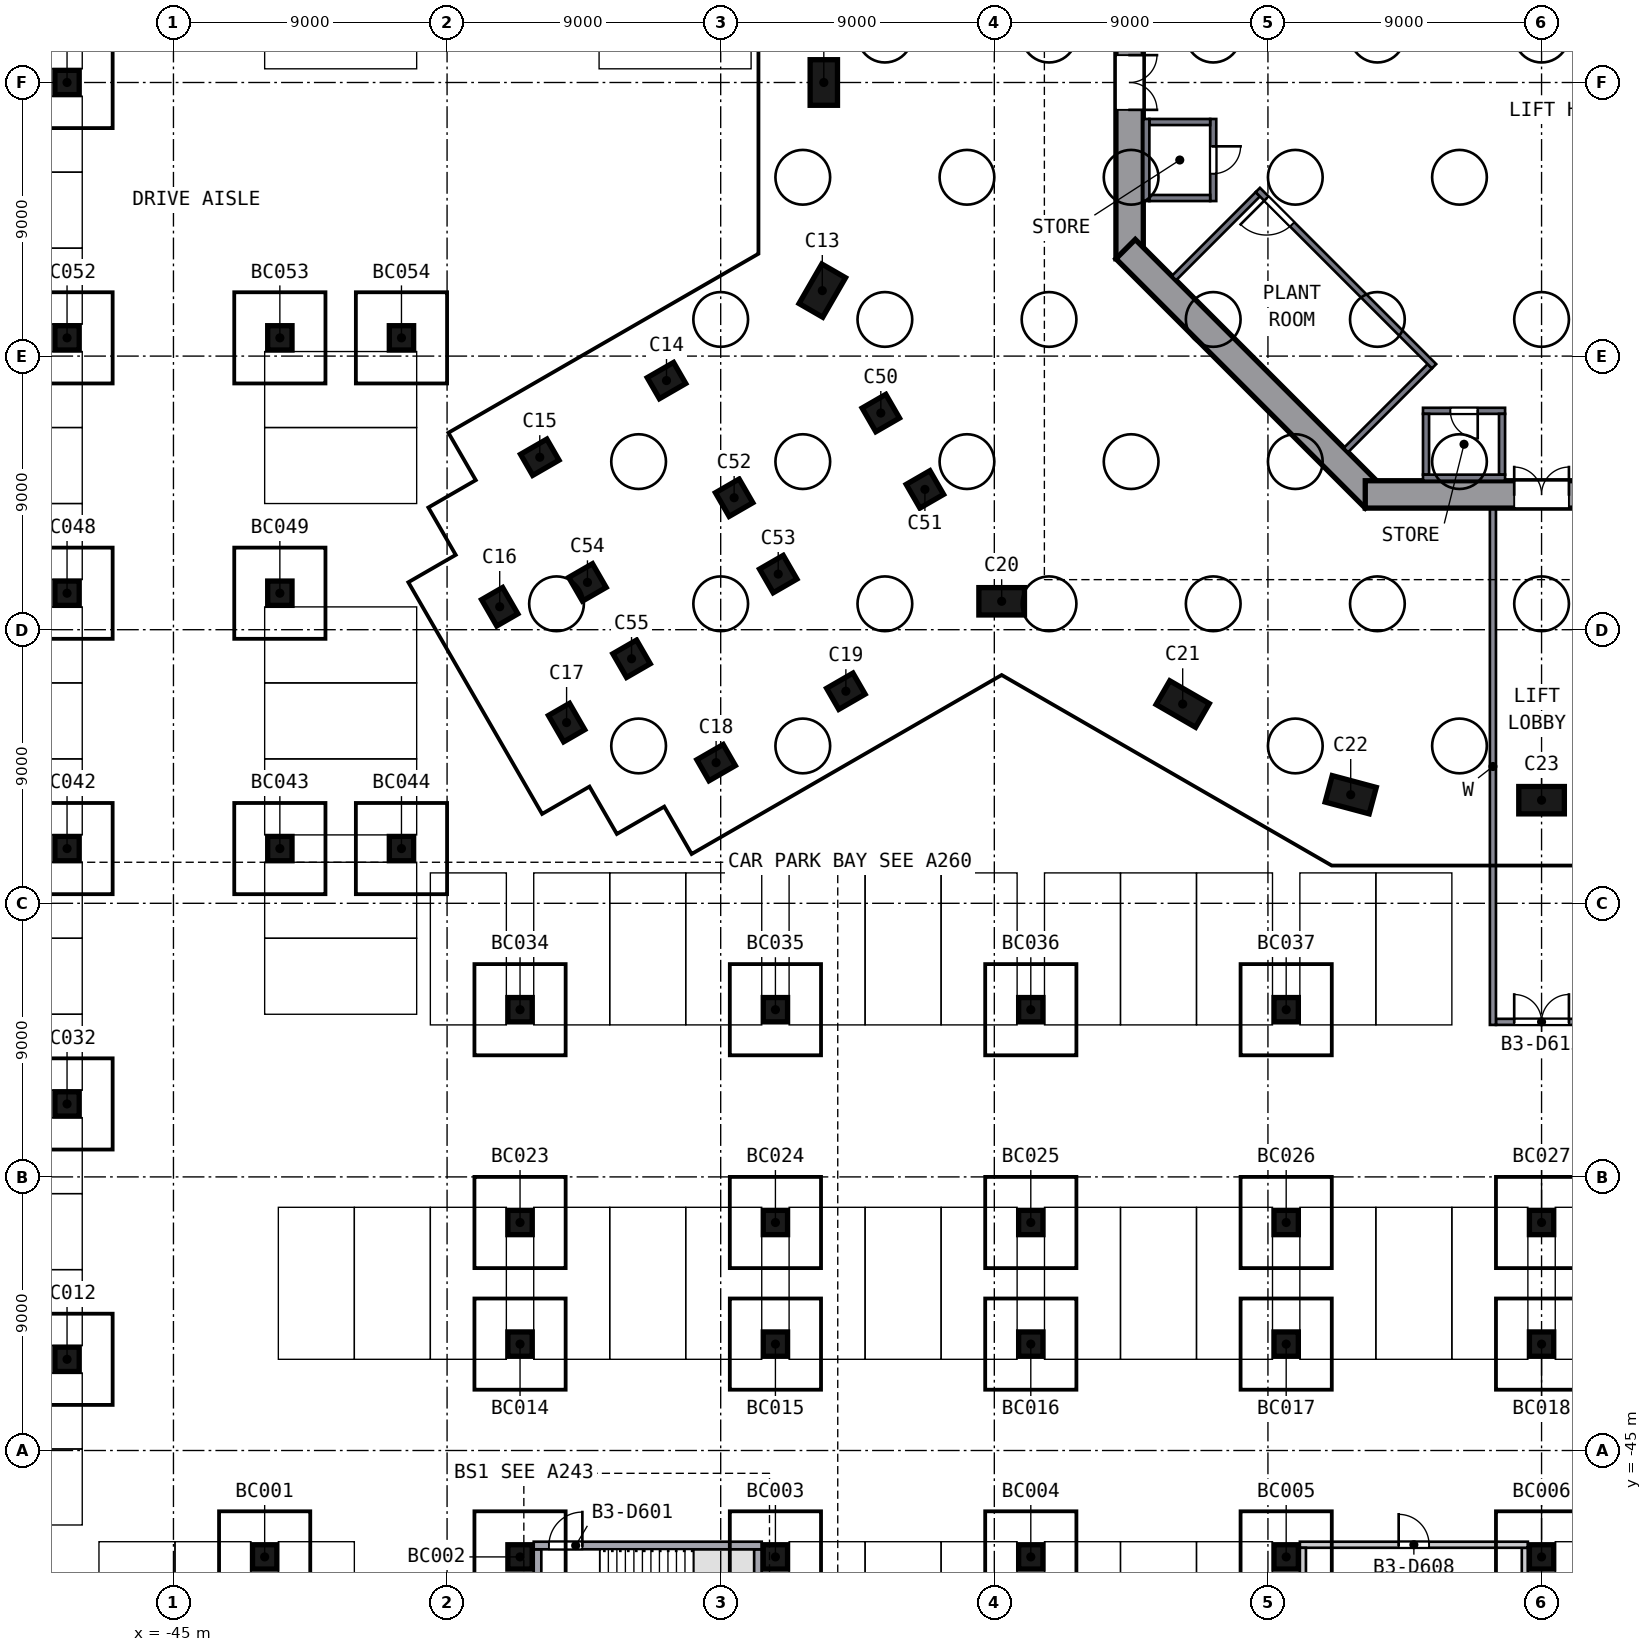
"""IFC4 building model, lengths in metres.
Left out: names, types, materials, properties, quantities, classifications, styles, units other than length and angle.
Written with IfcOpenShell. Run it as: python <this file> out.ifc"""

import sys

from ifc_helpers import new_model, si_unit, direction, frame, frame_2d, origin, origin_2d, place, context, subcontext, project, spatial, polyline, rectangle, outline, extrude, element, fill, save


model = new_model("IFC4")
c1 = context("Model", 3, precision=1e-05, world=origin(), true_north=direction((0.0, 1.0)))
c2 = subcontext(c1, "Body", "Model", "MODEL_VIEW")
j1 = project(units=[si_unit("LENGTHUNIT", "METRE"), si_unit("PLANEANGLEUNIT", "RADIAN")], contexts=[c1])
p1 = place(None, origin())
s1 = spatial("IfcSite", under=j1, at=p1, CompositionType="ELEMENT")
p2 = place(p1, origin())
s2 = spatial("IfcBuilding", under=s1, at=p2, CompositionType="ELEMENT")
p3 = place(p2, frame((0.0, 0.0, -11.7)))
s3 = spatial("IfcBuildingStorey", under=s2, at=p3, CompositionType="ELEMENT", Elevation=-11.7)
for number, where, z_axis, x_axis in (
    (1, (-23.608, 0.0, 0.0), (0.0, 0.0, 1.0), (0.0, -1.0, 0.0)),
    (2, (-23.658, -6.846, 0.0), (0.0, 0.0, 1.0), (0.5, 0.866, 0.0)),
):
    element("IfcColumn", number, at=place(p3, frame(where, z_axis=z_axis, x_axis=x_axis)), inside=s3, PredefinedType="COLUMN", context=c2, shape_type="SweptSolid", body=[
        extrude(rectangle(XDim=1.5, YDim=0.9, at=origin_2d()), origin(), (0.0, 0.0, 1.0), 3.45),
    ])
for number, where, z_axis, x_axis in (
    (3, (-28.783, -9.805, 0.0), (0.0, 0.0, 1.0), (-0.866, -0.5, 0.0)),
    (4, (-32.951, -12.327, 0.0), (0.0, 0.0, 1.0), (-0.866, -0.5, 0.0)),
    (5, (-34.269, -17.245, 0.0), (0.0, 0.0, 1.0), (0.5, -0.866, 0.0)),
    (6, (-32.069, -21.055, 0.0), (0.0, 0.0, 1.0), (0.5, -0.866, 0.0)),
    (7, (-27.151, -22.373, 0.0), (0.0, 0.0, 1.0), (0.866, 0.5, 0.0)),
    (8, (-22.883, -20.024, 0.0), (0.0, 0.0, 1.0), (0.866, 0.5, 0.0)),
):
    element("IfcColumn", number, at=place(p3, frame(where, z_axis=z_axis, x_axis=x_axis)), inside=s3, PredefinedType="COLUMN", context=c2, shape_type="SweptSolid", body=[
        extrude(rectangle(XDim=1.0, YDim=0.8, at=origin_2d()), origin(), (0.0, 0.0, 1.0), 3.45),
    ])
for number, where, z_axis, x_axis in (
    (9, (-17.758, -17.065, 0.0), (0.0, 0.0, 1.0), (-1.0, 0.0, 0.0)),
    (10, (-11.804, -20.445, 0.0), (0.0, 0.0, 1.0), (0.866, -0.5, 0.0)),
    (11, (-6.278, -23.428, 0.0), (0.0, 0.0, 1.0), (-0.966, 0.259, 0.0)),
    (12, (0.0, -23.608, 0.0), (0.0, 0.0, 1.0), (1.0, 0.0, 0.0)),
):
    element("IfcColumn", number, at=place(p3, frame(where, z_axis=z_axis, x_axis=x_axis)), inside=s3, PredefinedType="COLUMN", context=c2, shape_type="SweptSolid", body=[
        extrude(rectangle(XDim=1.5, YDim=0.9, at=origin_2d()), origin(), (0.0, 0.0, 1.0), 3.45),
    ])
for number, where, z_axis, x_axis in (
    (13, (-21.733, -10.873, 0.0), (0.0, 0.0, 1.0), (-0.866, -0.5, 0.0)),
    (14, (-20.283, -13.385, 0.0), (0.0, 0.0, 1.0), (-0.866, -0.5, 0.0)),
    (15, (-26.558, -13.659, 0.0), (0.0, 0.0, 1.0), (-0.866, -0.5, 0.0)),
    (16, (-25.108, -16.17, 0.0), (0.0, 0.0, 1.0), (-0.866, -0.5, 0.0)),
    (17, (-31.382, -16.444, 0.0), (0.0, 0.0, 1.0), (-0.866, -0.5, 0.0)),
    (18, (-29.932, -18.956, 0.0), (0.0, 0.0, 1.0), (-0.866, -0.5, 0.0)),
):
    element("IfcColumn", number, at=place(p3, frame(where, z_axis=z_axis, x_axis=x_axis)), inside=s3, PredefinedType="COLUMN", context=c2, shape_type="SweptSolid", body=[
        extrude(rectangle(XDim=0.9, YDim=0.9, at=origin_2d()), origin(), (0.0, 0.0, 1.0), 3.45),
    ])
p4 = place(p3, frame((-13.55, 5.799, 0.0), z_axis=(0.0, 0.0, 1.0), x_axis=(0.0, -1.0, 0.0)))
e19 = element("IfcWall", 19, at=p4, inside=s3, PredefinedType="SHEAR", context=c2, shape_type="SweptSolid", body=[
    extrude(rectangle(XDim=11.598, YDim=0.9, at=frame_2d((5.799, 0.0))), origin(), (0.0, 0.0, 1.0), 3.9),
])
p5 = place(p4, frame((4.899, 0.0, 0.0)))
e20 = element("IfcOpeningElement", 20, at=p5, cuts=e19, PredefinedType="OPENING", context=c2, shape_type="SweptSolid", body=[
    extrude(rectangle(XDim=1.8, YDim=2.1, at=frame_2d((0.9, 1.05))), frame((0.0, 0.46, 0.0), z_axis=(0.0, -1.0, 0.0), x_axis=(1.0, 0.0, 0.0)), (0.0, 0.0, 1.0), 0.92),
])
p6 = place(p3, frame((-13.682, -5.481, 0.0), z_axis=(0.0, 0.0, 1.0), x_axis=(0.707106781, -0.707106781, 0.0)))
e21 = element("IfcWall", 21, at=p6, inside=s3, PredefinedType="SHEAR", context=c2, shape_type="SweptSolid", body=[
    extrude(rectangle(XDim=11.598, YDim=0.9, at=frame_2d((5.799, 0.0))), origin(), (0.0, 0.0, 1.0), 3.9),
])
p7 = place(p3, frame((-5.799, -13.55, 0.0), z_axis=(0.0, 0.0, 1.0), x_axis=(1.0, 0.0, 0.0)))
e22 = element("IfcWall", 22, at=p7, inside=s3, PredefinedType="SHEAR", context=c2, shape_type="SweptSolid", body=[
    extrude(rectangle(XDim=11.598, YDim=0.9, at=frame_2d((5.799, 0.0))), origin(), (0.0, 0.0, 1.0), 3.9),
])
p8 = place(p7, frame((4.899, 0.0, 0.0)))
e23 = element("IfcOpeningElement", 23, at=p8, cuts=e22, PredefinedType="OPENING", context=c2, shape_type="SweptSolid", body=[
    extrude(rectangle(XDim=1.8, YDim=2.1, at=frame_2d((0.9, 1.05))), frame((0.0, 0.46, 0.0), z_axis=(0.0, -1.0, 0.0), x_axis=(1.0, 0.0, 0.0)), (0.0, 0.0, 1.0), 0.92),
])
for number, where, z_axis, x_axis in (
    (24, (-42.0, -48.5, -0.8), (0.0, 0.0, 1.0), (1.0, 0.0, 0.0)),
    (25, (-33.6, -48.5, -0.8), (0.0, 0.0, 1.0), (1.0, 0.0, 0.0)),
    (26, (-25.2, -48.5, -0.8), (0.0, 0.0, 1.0), (1.0, 0.0, 0.0)),
    (27, (-16.8, -48.5, -0.8), (0.0, 0.0, 1.0), (1.0, 0.0, 0.0)),
    (28, (-8.4, -48.5, -0.8), (0.0, 0.0, 1.0), (1.0, 0.0, 0.0)),
    (29, (0.0, -48.5, -0.8), (0.0, 0.0, 1.0), (1.0, 0.0, 0.0)),
    (30, (-48.5, -42.0, -0.8), (0.0, 0.0, 1.0), (1.0, 0.0, 0.0)),
    (31, (-33.6, -41.5, -0.8), (0.0, 0.0, 1.0), (1.0, 0.0, 0.0)),
    (32, (-25.2, -41.5, -0.8), (0.0, 0.0, 1.0), (1.0, 0.0, 0.0)),
    (33, (-16.8, -41.5, -0.8), (0.0, 0.0, 1.0), (1.0, 0.0, 0.0)),
    (34, (-8.4, -41.5, -0.8), (0.0, 0.0, 1.0), (1.0, 0.0, 0.0)),
    (35, (0.0, -41.5, -0.8), (0.0, 0.0, 1.0), (1.0, 0.0, 0.0)),
    (36, (-33.6, -37.5, -0.8), (0.0, 0.0, 1.0), (1.0, 0.0, 0.0)),
    (37, (-25.2, -37.5, -0.8), (0.0, 0.0, 1.0), (1.0, 0.0, 0.0)),
    (38, (-16.8, -37.5, -0.8), (0.0, 0.0, 1.0), (1.0, 0.0, 0.0)),
    (39, (-8.4, -37.5, -0.8), (0.0, 0.0, 1.0), (1.0, 0.0, 0.0)),
    (40, (0.0, -37.5, -0.8), (0.0, 0.0, 1.0), (1.0, 0.0, 0.0)),
    (41, (-48.5, -33.6, -0.8), (0.0, 0.0, 1.0), (1.0, 0.0, 0.0)),
    (42, (-33.6, -30.5, -0.8), (0.0, 0.0, 1.0), (1.0, 0.0, 0.0)),
    (43, (-25.2, -30.5, -0.8), (0.0, 0.0, 1.0), (1.0, 0.0, 0.0)),
    (44, (-16.8, -30.5, -0.8), (0.0, 0.0, 1.0), (1.0, 0.0, 0.0)),
    (45, (-8.4, -30.5, -0.8), (0.0, 0.0, 1.0), (1.0, 0.0, 0.0)),
    (46, (-48.5, -25.2, -0.8), (0.0, 0.0, 1.0), (1.0, 0.0, 0.0)),
    (47, (-41.5, -25.2, -0.8), (0.0, 0.0, 1.0), (1.0, 0.0, 0.0)),
    (48, (-37.5, -25.2, -0.8), (0.0, 0.0, 1.0), (1.0, 0.0, 0.0)),
    (49, (-48.5, -16.8, -0.8), (0.0, 0.0, 1.0), (1.0, 0.0, 0.0)),
    (50, (-41.5, -16.8, -0.8), (0.0, 0.0, 1.0), (1.0, 0.0, 0.0)),
    (51, (-48.5, -8.4, -0.8), (0.0, 0.0, 1.0), (1.0, 0.0, 0.0)),
    (52, (-41.5, -8.4, -0.8), (0.0, 0.0, 1.0), (1.0, 0.0, 0.0)),
    (53, (-37.5, -8.4, -0.8), (0.0, 0.0, 1.0), (1.0, 0.0, 0.0)),
    (54, (-48.5, 0.0, -0.8), (0.0, 0.0, 1.0), (1.0, 0.0, 0.0)),
):
    element("IfcColumn", number, at=place(p3, frame(where, z_axis=z_axis, x_axis=x_axis)), inside=s3, PredefinedType="COLUMN", context=c2, shape_type="SweptSolid", body=[
        extrude(rectangle(XDim=0.8, YDim=0.8, at=origin_2d()), origin(), (0.0, 0.0, 1.0), 4.7),
    ])
p9 = place(p3, origin())
e55 = element("IfcWall", 55, at=p9, inside=s3, PredefinedType="SOLIDWALL", context=c2, shape_type="SweptSolid", body=[
    extrude(outline(polyline([(-10.9, -1.2), (-10.9, -1.4), (-12.9, -1.4), (-12.9, -1.2), (-10.9, -1.2)])), origin(), (0.0, 0.0, 1.0), 3.45),
])
p10 = place(p3, origin())
e56 = element("IfcWall", 56, at=p10, inside=s3, PredefinedType="SOLIDWALL", context=c2, shape_type="SweptSolid", body=[
    extrude(outline(polyline([(-10.9, -3.7), (-10.9, -3.9), (-12.9, -3.9), (-12.9, -3.7), (-10.9, -3.7)])), origin(), (0.0, 0.0, 1.0), 3.45),
])
p11 = place(p3, origin())
e57 = element("IfcWall", 57, at=p11, inside=s3, PredefinedType="SOLIDWALL", context=c2, shape_type="SweptSolid", body=[
    extrude(outline(polyline([(-12.9, -1.2), (-12.9, -3.9), (-13.1, -3.9), (-13.1, -1.2), (-12.9, -1.2)])), origin(), (0.0, 0.0, 1.0), 3.45),
])
p12 = place(p3, frame((-10.8, -1.2, 0.0), z_axis=(0.0, 0.0, 1.0), x_axis=(0.0, -1.0, 0.0)))
e58 = element("IfcWall", 58, at=p12, inside=s3, PredefinedType="SOLIDWALL", context=c2, shape_type="SweptSolid", body=[
    extrude(rectangle(XDim=2.7, YDim=0.2, at=frame_2d((1.35, 0.0))), origin(), (0.0, 0.0, 1.0), 3.45),
])
p13 = place(p12, frame((0.9, 0.0, 0.0)))
e59 = element("IfcOpeningElement", 59, at=p13, cuts=e58, PredefinedType="OPENING", context=c2, shape_type="SweptSolid", body=[
    extrude(rectangle(XDim=0.9, YDim=2.1, at=frame_2d((0.45, 1.05))), frame((0.0, 0.11, 0.0), z_axis=(0.0, -1.0, 0.0), x_axis=(1.0, 0.0, 0.0)), (0.0, 0.0, 1.0), 0.22),
])
p14 = place(p3, origin())
e60 = element("IfcWall", 60, at=p14, inside=s3, PredefinedType="SOLIDWALL", context=c2, shape_type="SweptSolid", body=[
    extrude(outline(polyline([(-1.2, -10.9), (-1.2, -12.9), (-1.4, -12.9), (-1.4, -10.9), (-1.2, -10.9)])), origin(), (0.0, 0.0, 1.0), 3.45),
])
p15 = place(p3, origin())
e61 = element("IfcWall", 61, at=p15, inside=s3, PredefinedType="SOLIDWALL", context=c2, shape_type="SweptSolid", body=[
    extrude(outline(polyline([(-3.7, -10.9), (-3.7, -12.9), (-3.9, -12.9), (-3.9, -10.9), (-3.7, -10.9)])), origin(), (0.0, 0.0, 1.0), 3.45),
])
p16 = place(p3, origin())
e62 = element("IfcWall", 62, at=p16, inside=s3, PredefinedType="SOLIDWALL", context=c2, shape_type="SweptSolid", body=[
    extrude(outline(polyline([(-1.2, -12.9), (-1.2, -13.1), (-3.9, -13.1), (-3.9, -12.9), (-1.2, -12.9)])), origin(), (0.0, 0.0, 1.0), 3.45),
])
p17 = place(p3, frame((-1.2, -10.8, 0.0), z_axis=(0.0, 0.0, 1.0), x_axis=(-1.0, 0.0, 0.0)))
e63 = element("IfcWall", 63, at=p17, inside=s3, PredefinedType="SOLIDWALL", context=c2, shape_type="SweptSolid", body=[
    extrude(rectangle(XDim=2.7, YDim=0.2, at=frame_2d((1.35, 0.0))), origin(), (0.0, 0.0, 1.0), 3.45),
])
p18 = place(p17, frame((0.9, 0.0, 0.0)))
e64 = element("IfcOpeningElement", 64, at=p18, cuts=e63, PredefinedType="OPENING", context=c2, shape_type="SweptSolid", body=[
    extrude(rectangle(XDim=0.9, YDim=2.1, at=frame_2d((0.45, 1.05))), frame((0.0, 0.11, 0.0), z_axis=(0.0, -1.0, 0.0), x_axis=(1.0, 0.0, 0.0)), (0.0, 0.0, 1.0), 0.22),
])
p19 = place(p3, frame((-3.535, -9.334, 0.0), z_axis=(0.0, 0.0, 1.0), x_axis=(-0.707106781, 0.707106781, 0.0)))
e65 = element("IfcWall", 65, at=p19, inside=s3, PredefinedType="SOLIDWALL", context=c2, shape_type="SweptSolid", body=[
    extrude(rectangle(XDim=8.2, YDim=0.2, at=frame_2d((4.1, 0.0))), origin(), (0.0, 0.0, 1.0), 3.45),
])
p20 = place(p19, frame((6.6, 0.0, 0.0)))
e66 = element("IfcOpeningElement", 66, at=p20, cuts=e65, PredefinedType="OPENING", context=c2, shape_type="SweptSolid", body=[
    extrude(rectangle(XDim=1.2, YDim=2.1, at=frame_2d((0.6, 1.05))), frame((0.0, 0.11, 0.0), z_axis=(0.0, -1.0, 0.0), x_axis=(1.0, 0.0, 0.0)), (0.0, 0.0, 1.0), 0.22),
])
for number, where, z_axis, x_axis in (
    (67, (-9.334, -3.677, 0.0), (0.0, 0.0, 1.0), (-0.707, -0.707, 0.0)),
    (68, (-3.677, -9.334, 0.0), (0.0, 0.0, 1.0), (-0.707, -0.707, 0.0)),
):
    element("IfcWall", number, at=place(p3, frame(where, z_axis=z_axis, x_axis=x_axis)), inside=s3, PredefinedType="SOLIDWALL", context=c2, shape_type="SweptSolid", body=[
        extrude(rectangle(XDim=3.9, YDim=0.2, at=frame_2d((1.95, 0.0))), origin(), (0.0, 0.0, 1.0), 3.45),
    ])
p21 = place(p3, frame((-33.15, -48.125, 0.0), z_axis=(0.0, 0.0, 1.0), x_axis=(1.0, 0.0, 0.0)))
e69 = element("IfcWall", 69, at=p21, inside=s3, PredefinedType="SOLIDWALL", context=c2, shape_type="SweptSolid", body=[
    extrude(rectangle(XDim=7.5, YDim=0.25, at=frame_2d((3.75, 0.0))), origin(), (0.0, 0.0, 1.0), 3.9),
])
p22 = place(p21, frame((0.5, 0.0, 0.0)))
e70 = element("IfcOpeningElement", 70, at=p22, cuts=e69, PredefinedType="OPENING", context=c2, shape_type="SweptSolid", body=[
    extrude(rectangle(XDim=1.1, YDim=2.1, at=frame_2d((0.55, 1.05))), frame((0.0, 0.135, 0.0), z_axis=(0.0, -1.0, 0.0), x_axis=(1.0, 0.0, 0.0)), (0.0, 0.0, 1.0), 0.27),
])
for number, where, z_axis, x_axis in (
    (71, (-33.025, -52.2, 0.0), (0.0, 0.0, 1.0), (0.0, 1.0, 0.0)),
    (72, (-25.775, -52.2, 0.0), (0.0, 0.0, 1.0), (0.0, 1.0, 0.0)),
):
    element("IfcWall", number, at=place(p3, frame(where, z_axis=z_axis, x_axis=x_axis)), inside=s3, PredefinedType="SOLIDWALL", context=c2, shape_type="SweptSolid", body=[
        extrude(rectangle(XDim=3.95, YDim=0.25, at=frame_2d((1.975, 0.0))), origin(), (0.0, 0.0, 1.0), 3.9),
    ])
p23 = place(p3, frame((-7.95, -48.1, 0.0), z_axis=(0.0, 0.0, 1.0), x_axis=(1.0, 0.0, 0.0)))
e73 = element("IfcWall", 73, at=p23, inside=s3, PredefinedType="PARTITIONING", context=c2, shape_type="SweptSolid", body=[
    extrude(rectangle(XDim=7.5, YDim=0.2, at=frame_2d((3.75, 0.0))), origin(), (0.0, 0.0, 1.0), 3.45),
])
p24 = place(p23, frame((3.25, 0.0, 0.0)))
e74 = element("IfcOpeningElement", 74, at=p24, cuts=e73, PredefinedType="OPENING", context=c2, shape_type="SweptSolid", body=[
    extrude(rectangle(XDim=1.0, YDim=2.1, at=frame_2d((0.5, 1.05))), frame((0.0, 0.11, 0.0), z_axis=(0.0, -1.0, 0.0), x_axis=(1.0, 0.0, 0.0)), (0.0, 0.0, 1.0), 0.22),
])
for number, where, z_axis, x_axis in (
    (75, (-7.85, -52.8, 0.0), (0.0, 0.0, 1.0), (0.0, 1.0, 0.0)),
    (76, (-0.55, -52.8, 0.0), (0.0, 0.0, 1.0), (0.0, 1.0, 0.0)),
):
    element("IfcWall", number, at=place(p3, frame(where, z_axis=z_axis, x_axis=x_axis)), inside=s3, PredefinedType="PARTITIONING", context=c2, shape_type="SweptSolid", body=[
        extrude(rectangle(XDim=4.6, YDim=0.2, at=frame_2d((2.3, 0.0))), origin(), (0.0, 0.0, 1.0), 3.45),
    ])
p25 = place(p3, frame((-1.6, -31.0, 0.0), z_axis=(0.0, 0.0, 1.0), x_axis=(0.0, 1.0, 0.0)))
e77 = element("IfcWall", 77, at=p25, inside=s3, PredefinedType="PARTITIONING", context=c2, shape_type="SweptSolid", body=[
    extrude(rectangle(XDim=17.0, YDim=0.2, at=frame_2d((8.5, 0.0))), origin(), (0.0, 0.0, 1.0), 3.45),
])
p26 = place(p3, frame((-1.5, -30.9, 0.0), z_axis=(0.0, 0.0, 1.0), x_axis=(1.0, 0.0, 0.0)))
e78 = element("IfcWall", 78, at=p26, inside=s3, PredefinedType="PARTITIONING", context=c2, shape_type="SweptSolid", body=[
    extrude(rectangle(XDim=3.0, YDim=0.2, at=frame_2d((1.5, 0.0))), origin(), (0.0, 0.0, 1.0), 3.45),
])
p27 = place(p26, frame((0.6, 0.0, 0.0)))
e79 = element("IfcOpeningElement", 79, at=p27, cuts=e78, PredefinedType="OPENING", context=c2, shape_type="SweptSolid", body=[
    extrude(rectangle(XDim=1.8, YDim=2.1, at=frame_2d((0.9, 1.05))), frame((0.0, 0.11, 0.0), z_axis=(0.0, -1.0, 0.0), x_axis=(1.0, 0.0, 0.0)), (0.0, 0.0, 1.0), 0.22),
])
p28 = place(p13, origin())
e80 = element("IfcDoor", 80, at=p28, inside=s3, OperationType="SINGLE_SWING_LEFT", PredefinedType="DOOR", context=c2, shape_type="SweptSolid", body=[
    extrude(rectangle(XDim=0.9, YDim=2.1, at=frame_2d((0.45, 1.05))), frame((0.0, 0.025, 0.0), z_axis=(0.0, -1.0, 0.0), x_axis=(1.0, 0.0, 0.0)), (0.0, 0.0, 1.0), 0.05),
])
fill(e59, e80)
p29 = place(p18, origin())
e81 = element("IfcDoor", 81, at=p29, inside=s3, OperationType="SINGLE_SWING_LEFT", PredefinedType="DOOR", context=c2, shape_type="SweptSolid", body=[
    extrude(rectangle(XDim=0.9, YDim=2.1, at=frame_2d((0.45, 1.05))), frame((0.0, 0.025, 0.0), z_axis=(0.0, -1.0, 0.0), x_axis=(1.0, 0.0, 0.0)), (0.0, 0.0, 1.0), 0.05),
])
fill(e64, e81)
p30 = place(p20, origin())
e82 = element("IfcDoor", 82, at=p30, inside=s3, OperationType="SINGLE_SWING_RIGHT", PredefinedType="DOOR", context=c2, shape_type="SweptSolid", body=[
    extrude(rectangle(XDim=1.2, YDim=2.1, at=frame_2d((0.6, 1.05))), frame((0.0, 0.025, 0.0), z_axis=(0.0, -1.0, 0.0), x_axis=(1.0, 0.0, 0.0)), (0.0, 0.0, 1.0), 0.05),
])
fill(e66, e82)
p31 = place(p5, origin())
e83 = element("IfcDoor", 83, at=p31, inside=s3, OperationType="DOUBLE_DOOR_SINGLE_SWING", PredefinedType="DOOR", context=c2, shape_type="SweptSolid", body=[
    extrude(rectangle(XDim=1.8, YDim=2.1, at=frame_2d((0.9, 1.05))), frame((0.0, 0.025, 0.0), z_axis=(0.0, -1.0, 0.0), x_axis=(1.0, 0.0, 0.0)), (0.0, 0.0, 1.0), 0.05),
])
fill(e20, e83)
p32 = place(p8, origin())
e84 = element("IfcDoor", 84, at=p32, inside=s3, OperationType="DOUBLE_DOOR_SINGLE_SWING", PredefinedType="DOOR", context=c2, shape_type="SweptSolid", body=[
    extrude(rectangle(XDim=1.8, YDim=2.1, at=frame_2d((0.9, 1.05))), frame((0.0, 0.025, 0.0), z_axis=(0.0, -1.0, 0.0), x_axis=(1.0, 0.0, 0.0)), (0.0, 0.0, 1.0), 0.05),
])
fill(e23, e84)
p33 = place(p22, origin())
e85 = element("IfcDoor", 85, at=p33, inside=s3, OperationType="SINGLE_SWING_RIGHT", PredefinedType="DOOR", context=c2, shape_type="SweptSolid", body=[
    extrude(rectangle(XDim=1.1, YDim=2.1, at=frame_2d((0.55, 1.05))), frame((0.0, 0.025, 0.0), z_axis=(0.0, -1.0, 0.0), x_axis=(1.0, 0.0, 0.0)), (0.0, 0.0, 1.0), 0.05),
])
fill(e70, e85)
p34 = place(p24, origin())
e86 = element("IfcDoor", 86, at=p34, inside=s3, OperationType="SINGLE_SWING_LEFT", PredefinedType="DOOR", context=c2, shape_type="SweptSolid", body=[
    extrude(rectangle(XDim=1.0, YDim=2.1, at=frame_2d((0.5, 1.05))), frame((0.0, 0.025, 0.0), z_axis=(0.0, -1.0, 0.0), x_axis=(1.0, 0.0, 0.0)), (0.0, 0.0, 1.0), 0.05),
])
fill(e74, e86)
p35 = place(p27, origin())
e87 = element("IfcDoor", 87, at=p35, inside=s3, OperationType="DOUBLE_DOOR_SINGLE_SWING", PredefinedType="DOOR", context=c2, shape_type="SweptSolid", body=[
    extrude(rectangle(XDim=1.8, YDim=2.1, at=frame_2d((0.9, 1.05))), frame((0.0, 0.025, 0.0), z_axis=(0.0, -1.0, 0.0), x_axis=(1.0, 0.0, 0.0)), (0.0, 0.0, 1.0), 0.05),
])
fill(e79, e87)
save(model, sys.argv[1])
